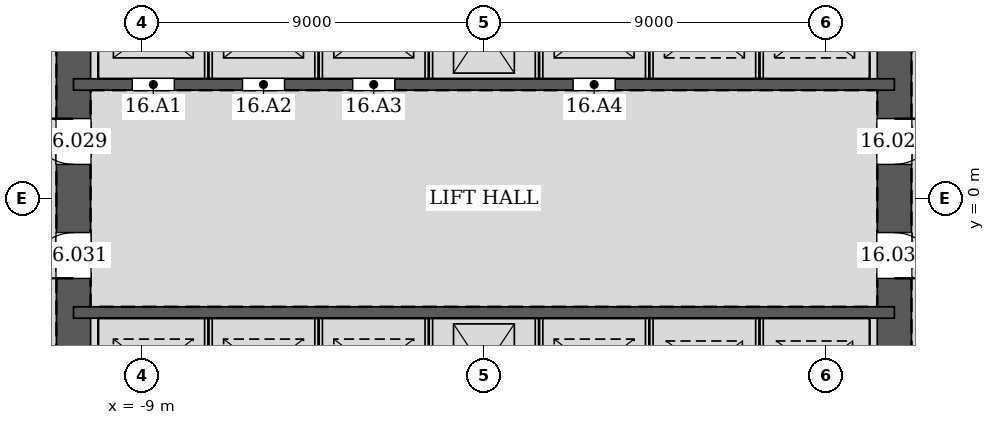
"""IFC4 building model, lengths in metres.
Left out: names, types, materials, properties, quantities, classifications, styles, units other than length and angle.
Written with IfcOpenShell. Run it as: python <this file> out.ifc"""

import sys

from ifc_helpers import new_model, si_unit, direction, frame, frame_2d, origin, place, context, subcontext, project, spatial, rectangle, extrude, element, fill, save


model = new_model("IFC4")
c1 = context("Model", 3, precision=1e-05, world=origin(), true_north=direction((0.0, 1.0)))
c2 = subcontext(c1, "Body", "Model", "MODEL_VIEW")
j1 = project(units=[si_unit("LENGTHUNIT", "METRE"), si_unit("PLANEANGLEUNIT", "RADIAN")], contexts=[c1])
p1 = place(None, origin())
s1 = spatial("IfcSite", under=j1, at=p1, CompositionType="ELEMENT")
p2 = place(p1, origin())
s2 = spatial("IfcBuilding", under=s1, at=p2, CompositionType="ELEMENT")
p3 = place(p2, frame((0.0, 0.0, 75.0)))
s3 = spatial("IfcBuildingStorey", under=s2, at=p3, CompositionType="ELEMENT", Elevation=75.0)
p4 = place(p3, frame((10.8, -10.8, 0.0), z_axis=(0.0, 0.0, 1.0), x_axis=(0.0, 1.0, 0.0)))
e1 = element("IfcWall", 1, at=p4, inside=s3, PredefinedType="SOLIDWALL", context=c2, shape_type="SweptSolid", body=[
    extrude(rectangle(XDim=21.6, YDim=0.9, at=frame_2d((10.8, 0.0))), origin(), (0.0, 0.0, 1.0), 4.2),
])
p5 = place(p4, frame((11.7, 0.0, 0.0)))
e2 = element("IfcOpeningElement", 2, at=p5, cuts=e1, PredefinedType="OPENING", context=c2, shape_type="SweptSolid", body=[
    extrude(rectangle(XDim=1.2, YDim=2.1, at=frame_2d((0.6, 1.05))), frame((0.0, 0.46, 0.0), z_axis=(0.0, -1.0, 0.0), x_axis=(1.0, 0.0, 0.0)), (0.0, 0.0, 1.0), 0.92),
])
p6 = place(p4, frame((8.7, 0.0, 0.0)))
e3 = element("IfcOpeningElement", 3, at=p6, cuts=e1, PredefinedType="OPENING", context=c2, shape_type="SweptSolid", body=[
    extrude(rectangle(XDim=1.2, YDim=2.1, at=frame_2d((0.6, 1.05))), frame((0.0, 0.46, 0.0), z_axis=(0.0, -1.0, 0.0), x_axis=(1.0, 0.0, 0.0)), (0.0, 0.0, 1.0), 0.92),
])
p7 = place(p3, frame((-10.8, 10.8, 0.0), z_axis=(0.0, 0.0, 1.0), x_axis=(0.0, -1.0, 0.0)))
e4 = element("IfcWall", 4, at=p7, inside=s3, PredefinedType="SOLIDWALL", context=c2, shape_type="SweptSolid", body=[
    extrude(rectangle(XDim=21.6, YDim=0.9, at=frame_2d((10.8, 0.0))), origin(), (0.0, 0.0, 1.0), 4.2),
])
p8 = place(p7, frame((8.7, 0.0, 0.0)))
e5 = element("IfcOpeningElement", 5, at=p8, cuts=e4, PredefinedType="OPENING", context=c2, shape_type="SweptSolid", body=[
    extrude(rectangle(XDim=1.2, YDim=2.1, at=frame_2d((0.6, 1.05))), frame((0.0, 0.46, 0.0), z_axis=(0.0, -1.0, 0.0), x_axis=(1.0, 0.0, 0.0)), (0.0, 0.0, 1.0), 0.92),
])
p9 = place(p7, frame((11.7, 0.0, 0.0)))
e6 = element("IfcOpeningElement", 6, at=p9, cuts=e4, PredefinedType="OPENING", context=c2, shape_type="SweptSolid", body=[
    extrude(rectangle(XDim=1.2, YDim=2.1, at=frame_2d((0.6, 1.05))), frame((0.0, 0.46, 0.0), z_axis=(0.0, -1.0, 0.0), x_axis=(1.0, 0.0, 0.0)), (0.0, 0.0, 1.0), 0.92),
])
p10 = place(p3, frame((-10.8, 3.0, 0.0), z_axis=(0.0, 0.0, 1.0), x_axis=(1.0, 0.0, 0.0)))
e7 = element("IfcWall", 7, at=p10, inside=s3, PredefinedType="SOLIDWALL", context=c2, shape_type="SweptSolid", body=[
    extrude(rectangle(XDim=21.6, YDim=0.3, at=frame_2d((10.8, 0.0))), origin(), (0.0, 0.0, 1.0), 4.2),
])
p11 = place(p10, frame((1.55, 0.0, 0.0)))
e8 = element("IfcOpeningElement", 8, at=p11, cuts=e7, PredefinedType="OPENING", context=c2, shape_type="SweptSolid", body=[
    extrude(rectangle(XDim=1.1, YDim=2.1, at=frame_2d((0.55, 1.05))), frame((0.0, 0.16, 0.0), z_axis=(0.0, -1.0, 0.0), x_axis=(1.0, 0.0, 0.0)), (0.0, 0.0, 1.0), 0.32),
])
p12 = place(p10, frame((4.45, 0.0, 0.0)))
e9 = element("IfcOpeningElement", 9, at=p12, cuts=e7, PredefinedType="OPENING", context=c2, shape_type="SweptSolid", body=[
    extrude(rectangle(XDim=1.1, YDim=2.1, at=frame_2d((0.55, 1.05))), frame((0.0, 0.16, 0.0), z_axis=(0.0, -1.0, 0.0), x_axis=(1.0, 0.0, 0.0)), (0.0, 0.0, 1.0), 0.32),
])
p13 = place(p10, frame((7.35, 0.0, 0.0)))
e10 = element("IfcOpeningElement", 10, at=p13, cuts=e7, PredefinedType="OPENING", context=c2, shape_type="SweptSolid", body=[
    extrude(rectangle(XDim=1.1, YDim=2.1, at=frame_2d((0.55, 1.05))), frame((0.0, 0.16, 0.0), z_axis=(0.0, -1.0, 0.0), x_axis=(1.0, 0.0, 0.0)), (0.0, 0.0, 1.0), 0.32),
])
p14 = place(p10, frame((13.15, 0.0, 0.0)))
e11 = element("IfcOpeningElement", 11, at=p14, cuts=e7, PredefinedType="OPENING", context=c2, shape_type="SweptSolid", body=[
    extrude(rectangle(XDim=1.1, YDim=2.1, at=frame_2d((0.55, 1.05))), frame((0.0, 0.16, 0.0), z_axis=(0.0, -1.0, 0.0), x_axis=(1.0, 0.0, 0.0)), (0.0, 0.0, 1.0), 0.32),
])
p15 = place(p3, frame((-10.8, -3.0, 0.0), z_axis=(0.0, 0.0, 1.0), x_axis=(1.0, 0.0, 0.0)))
e12 = element("IfcWall", 12, at=p15, inside=s3, PredefinedType="SOLIDWALL", context=c2, shape_type="SweptSolid", body=[
    extrude(rectangle(XDim=21.6, YDim=0.3, at=frame_2d((10.8, 0.0))), origin(), (0.0, 0.0, 1.0), 4.2),
])
for number, where, z_axis, x_axis in (
    (13, (-7.25, 3.15, 0.0), (0.0, 0.0, 1.0), (0.0, 1.0, 0.0)),
    (14, (-4.35, 3.15, 0.0), (0.0, 0.0, 1.0), (0.0, 1.0, 0.0)),
    (15, (-1.45, 3.15, 0.0), (0.0, 0.0, 1.0), (0.0, 1.0, 0.0)),
    (16, (1.45, 3.15, 0.0), (0.0, 0.0, 1.0), (0.0, 1.0, 0.0)),
    (17, (4.35, 3.15, 0.0), (0.0, 0.0, 1.0), (0.0, 1.0, 0.0)),
    (18, (7.25, 3.15, 0.0), (0.0, 0.0, 1.0), (0.0, 1.0, 0.0)),
    (19, (-7.25, -5.85, 0.0), (0.0, 0.0, 1.0), (0.0, 1.0, 0.0)),
    (20, (-4.35, -5.85, 0.0), (0.0, 0.0, 1.0), (0.0, 1.0, 0.0)),
    (21, (-1.45, -5.85, 0.0), (0.0, 0.0, 1.0), (0.0, 1.0, 0.0)),
    (22, (1.45, -5.85, 0.0), (0.0, 0.0, 1.0), (0.0, 1.0, 0.0)),
    (23, (4.35, -5.85, 0.0), (0.0, 0.0, 1.0), (0.0, 1.0, 0.0)),
    (24, (7.25, -5.85, 0.0), (0.0, 0.0, 1.0), (0.0, 1.0, 0.0)),
):
    element("IfcWall", number, at=place(p3, frame(where, z_axis=z_axis, x_axis=x_axis)), inside=s3, PredefinedType="PARTITIONING", context=c2, shape_type="SweptSolid", body=[
        extrude(rectangle(XDim=2.7, YDim=0.2, at=frame_2d((1.35, 0.0))), origin(), (0.0, 0.0, 1.0), 4.2),
    ])
p16 = place(p5, frame((1.2, 0.0, 0.0), z_axis=(0.0, 0.0, 1.0), x_axis=(-1.0, 0.0, 0.0)))
e25 = element("IfcDoor", 25, at=p16, inside=s3, OperationType="SINGLE_SWING_LEFT", PredefinedType="DOOR", context=c2, shape_type="SweptSolid", body=[
    extrude(rectangle(XDim=1.2, YDim=2.1, at=frame_2d((0.6, 1.05))), frame((0.0, 0.025, 0.0), z_axis=(0.0, -1.0, 0.0), x_axis=(1.0, 0.0, 0.0)), (0.0, 0.0, 1.0), 0.05),
])
fill(e2, e25)
p17 = place(p8, frame((1.2, 0.0, 0.0), z_axis=(0.0, 0.0, 1.0), x_axis=(-1.0, 0.0, 0.0)))
e26 = element("IfcDoor", 26, at=p17, inside=s3, OperationType="SINGLE_SWING_RIGHT", PredefinedType="DOOR", context=c2, shape_type="SweptSolid", body=[
    extrude(rectangle(XDim=1.2, YDim=2.1, at=frame_2d((0.6, 1.05))), frame((0.0, 0.025, 0.0), z_axis=(0.0, -1.0, 0.0), x_axis=(1.0, 0.0, 0.0)), (0.0, 0.0, 1.0), 0.05),
])
fill(e5, e26)
p18 = place(p6, frame((1.2, 0.0, 0.0), z_axis=(0.0, 0.0, 1.0), x_axis=(-1.0, 0.0, 0.0)))
e27 = element("IfcDoor", 27, at=p18, inside=s3, OperationType="SINGLE_SWING_RIGHT", PredefinedType="DOOR", context=c2, shape_type="SweptSolid", body=[
    extrude(rectangle(XDim=1.2, YDim=2.1, at=frame_2d((0.6, 1.05))), frame((0.0, 0.025, 0.0), z_axis=(0.0, -1.0, 0.0), x_axis=(1.0, 0.0, 0.0)), (0.0, 0.0, 1.0), 0.05),
])
fill(e3, e27)
p19 = place(p9, frame((1.2, 0.0, 0.0), z_axis=(0.0, 0.0, 1.0), x_axis=(-1.0, 0.0, 0.0)))
e28 = element("IfcDoor", 28, at=p19, inside=s3, OperationType="SINGLE_SWING_LEFT", PredefinedType="DOOR", context=c2, shape_type="SweptSolid", body=[
    extrude(rectangle(XDim=1.2, YDim=2.1, at=frame_2d((0.6, 1.05))), frame((0.0, 0.025, 0.0), z_axis=(0.0, -1.0, 0.0), x_axis=(1.0, 0.0, 0.0)), (0.0, 0.0, 1.0), 0.05),
])
fill(e6, e28)
p20 = place(p11, origin())
e29 = element("IfcDoor", 29, at=p20, inside=s3, OperationType="DOUBLE_DOOR_SLIDING", PredefinedType="DOOR", context=c2, shape_type="SweptSolid", body=[
    extrude(rectangle(XDim=1.1, YDim=2.1, at=frame_2d((0.55, 1.05))), frame((0.0, 0.025, 0.0), z_axis=(0.0, -1.0, 0.0), x_axis=(1.0, 0.0, 0.0)), (0.0, 0.0, 1.0), 0.05),
])
fill(e8, e29)
p21 = place(p12, origin())
e30 = element("IfcDoor", 30, at=p21, inside=s3, OperationType="DOUBLE_DOOR_SLIDING", PredefinedType="DOOR", context=c2, shape_type="SweptSolid", body=[
    extrude(rectangle(XDim=1.1, YDim=2.1, at=frame_2d((0.55, 1.05))), frame((0.0, 0.025, 0.0), z_axis=(0.0, -1.0, 0.0), x_axis=(1.0, 0.0, 0.0)), (0.0, 0.0, 1.0), 0.05),
])
fill(e9, e30)
p22 = place(p13, origin())
e31 = element("IfcDoor", 31, at=p22, inside=s3, OperationType="DOUBLE_DOOR_SLIDING", PredefinedType="DOOR", context=c2, shape_type="SweptSolid", body=[
    extrude(rectangle(XDim=1.1, YDim=2.1, at=frame_2d((0.55, 1.05))), frame((0.0, 0.025, 0.0), z_axis=(0.0, -1.0, 0.0), x_axis=(1.0, 0.0, 0.0)), (0.0, 0.0, 1.0), 0.05),
])
fill(e10, e31)
p23 = place(p14, origin())
e32 = element("IfcDoor", 32, at=p23, inside=s3, OperationType="DOUBLE_DOOR_SLIDING", PredefinedType="DOOR", context=c2, shape_type="SweptSolid", body=[
    extrude(rectangle(XDim=1.1, YDim=2.1, at=frame_2d((0.55, 1.05))), frame((0.0, 0.025, 0.0), z_axis=(0.0, -1.0, 0.0), x_axis=(1.0, 0.0, 0.0)), (0.0, 0.0, 1.0), 0.05),
])
fill(e11, e32)
save(model, sys.argv[1])
